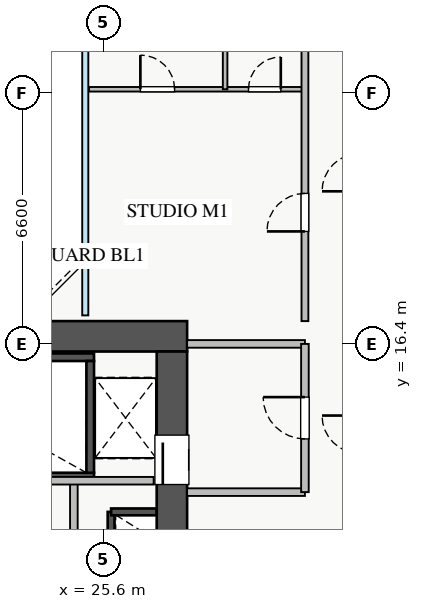
"""IFC4 building model, lengths in metres.
Left out: names, types, materials, properties, quantities, classifications, styles, units other than length and angle.
Written with IfcOpenShell. Run it as: python <this file> out.ifc"""

import sys

from ifc_helpers import new_model, si_unit, direction, frame, frame_2d, origin, place, context, subcontext, project, spatial, rectangle, extrude, source, transform, mapped, element, fill, save


model = new_model("IFC4")
c1 = context("Model", 3, precision=1e-05, world=origin(), true_north=direction((0.0, 1.0)))
c2 = subcontext(c1, "Body", "Model", "MODEL_VIEW")
j1 = project(units=[si_unit("LENGTHUNIT", "METRE"), si_unit("PLANEANGLEUNIT", "RADIAN")], contexts=[c1])
p1 = place(None, origin())
s1 = spatial("IfcSite", under=j1, at=p1, CompositionType="ELEMENT")
p2 = place(p1, origin())
s2 = spatial("IfcBuilding", under=s1, at=p2, CompositionType="ELEMENT")
p3 = place(p2, frame((0.0, 0.0, 42.5)))
s3 = spatial("IfcBuildingStorey", under=s2, at=p3, CompositionType="ELEMENT", Elevation=42.5)
p4 = place(p3, frame((25.8, 10.92, 0.0), z_axis=(0.0, 0.0, 1.0), x_axis=(0.0, 1.0, 0.0)))
e1 = element("IfcWall", 1, at=p4, inside=s3, PredefinedType="SHEAR", context=c2, shape_type="SweptSolid", body=[
    extrude(rectangle(XDim=1.06, YDim=0.18, at=frame_2d((0.53, 0.0))), origin(), (0.0, 0.0, 1.0), 3.03),
])
p5 = place(p3, frame((25.8, 11.98, 0.0), z_axis=(0.0, 0.0, 1.0), x_axis=(1.0, 0.0, 0.0)))
e2 = element("IfcWall", 2, at=p5, inside=s3, PredefinedType="SHEAR", context=c2, shape_type="SweptSolid", body=[
    extrude(rectangle(XDim=1.2, YDim=0.18, at=frame_2d((0.6, 0.0))), origin(), (0.0, 0.0, 1.0), 3.03),
])
p6 = place(p3, frame((18.2, 12.91, 0.0), z_axis=(0.0, 0.0, 1.0), x_axis=(1.0, 0.0, 0.0)))
e3 = element("IfcWall", 3, at=p6, inside=s3, PredefinedType="SHEAR", context=c2, shape_type="SweptSolid", body=[
    extrude(rectangle(XDim=7.15, YDim=0.2, at=frame_2d((3.575, 0.0))), origin(), (0.0, 0.0, 1.0), 3.25),
])
p7 = place(p6, frame((0.35, 0.0, 0.0)))
e4 = element("IfcOpeningElement", 4, at=p7, cuts=e3, PredefinedType="OPENING", context=c2, shape_type="SweptSolid", body=[
    extrude(rectangle(XDim=1.1, YDim=2.05, at=frame_2d((0.55, 1.025))), frame((0.0, 0.11, 0.0), z_axis=(0.0, -1.0, 0.0), x_axis=(1.0, 0.0, 0.0)), (0.0, 0.0, 1.0), 0.22),
])
p8 = place(p3, frame((18.2, 16.05, 0.0), z_axis=(0.0, 0.0, 1.0), x_axis=(1.0, 0.0, 0.0)))
e5 = element("IfcWall", 5, at=p8, inside=s3, PredefinedType="SHEAR", context=c2, shape_type="SweptSolid", body=[
    extrude(rectangle(XDim=7.15, YDim=0.2, at=frame_2d((3.575, 0.0))), origin(), (0.0, 0.0, 1.0), 3.25),
])
p9 = place(p3, frame((25.25, 13.01, 0.0), z_axis=(0.0, 0.0, 1.0), x_axis=(0.0, 1.0, 0.0)))
e6 = element("IfcWall", 6, at=p9, inside=s3, PredefinedType="SHEAR", context=c2, shape_type="SweptSolid", body=[
    extrude(rectangle(XDim=2.94, YDim=0.2, at=frame_2d((1.47, 0.0))), origin(), (0.0, 0.0, 1.0), 3.25),
])
p10 = place(p3, frame((10.2, 16.6, 0.0), z_axis=(0.0, 0.0, 1.0), x_axis=(1.0, 0.0, 0.0)))
e7 = element("IfcWall", 7, at=p10, inside=s3, PredefinedType="SHEAR", context=c2, shape_type="SweptSolid", body=[
    extrude(rectangle(XDim=17.6, YDim=0.8, at=frame_2d((8.8, 0.0))), origin(), (0.0, 0.0, 1.0), 3.25),
])
p11 = place(p3, frame((27.4, 10.6, 0.0), z_axis=(0.0, 0.0, 1.0), x_axis=(0.0, 1.0, 0.0)))
e8 = element("IfcWall", 8, at=p11, inside=s3, PredefinedType="SHEAR", context=c2, shape_type="SweptSolid", body=[
    extrude(rectangle(XDim=5.6, YDim=0.8, at=frame_2d((2.8, 0.0))), origin(), (0.0, 0.0, 1.0), 3.25),
])
p12 = place(p11, frame((2.1, 0.0, 0.0)))
e9 = element("IfcOpeningElement", 9, at=p12, cuts=e8, PredefinedType="OPENING", context=c2, shape_type="SweptSolid", body=[
    extrude(rectangle(XDim=1.3, YDim=2.05, at=frame_2d((0.65, 1.025))), frame((0.0, 0.41, 0.0), z_axis=(0.0, -1.0, 0.0), x_axis=(1.0, 0.0, 0.0)), (0.0, 0.0, 1.0), 0.82),
])
for number, where, z_axis, x_axis in (
    (10, (27.8, 16.4, 0.0), (0.0, 0.0, 1.0), (1.0, 0.0, 0.0)),
    (11, (27.8, 12.5, 0.0), (0.0, 0.0, 1.0), (1.0, 0.0, 0.0)),
):
    element("IfcWall", number, at=place(p3, frame(where, z_axis=z_axis, x_axis=x_axis)), inside=s3, PredefinedType="PARTITIONING", context=c2, shape_type="SweptSolid", body=[
        extrude(rectangle(XDim=3.1, YDim=0.2, at=frame_2d((1.55, 0.0))), origin(), (0.0, 0.0, 1.0), 3.03),
    ])
p13 = place(p3, frame((30.9, 12.5, 0.0), z_axis=(0.0, 0.0, 1.0), x_axis=(0.0, 1.0, 0.0)))
e12 = element("IfcWall", 12, at=p13, inside=s3, PredefinedType="PARTITIONING", context=c2, shape_type="SweptSolid", body=[
    extrude(rectangle(XDim=3.9, YDim=0.2, at=frame_2d((1.95, 0.0))), origin(), (0.0, 0.0, 1.0), 3.03),
])
p14 = place(p13, frame((1.4, 0.0, 0.0)))
e13 = element("IfcOpeningElement", 13, at=p14, cuts=e12, PredefinedType="OPENING", context=c2, shape_type="SweptSolid", body=[
    extrude(rectangle(XDim=1.1, YDim=2.05, at=frame_2d((0.55, 1.025))), frame((0.0, 0.11, 0.0), z_axis=(0.0, -1.0, 0.0), x_axis=(1.0, 0.0, 0.0)), (0.0, 0.0, 1.0), 0.22),
])
p15 = place(p3, frame((24.82, 10.15, 0.0), z_axis=(0.0, 0.0, 1.0), x_axis=(0.0, 1.0, 0.0)))
e14 = element("IfcWall", 14, at=p15, inside=s3, PredefinedType="PARTITIONING", context=c2, shape_type="SweptSolid", body=[
    extrude(rectangle(XDim=2.65, YDim=0.2, at=frame_2d((1.325, 0.0))), origin(), (0.0, 0.0, 1.0), 3.03),
])
p16 = place(p3, frame((21.75, 12.8, 0.0), z_axis=(0.0, 0.0, 1.0), x_axis=(1.0, 0.0, 0.0)))
e15 = element("IfcWall", 15, at=p16, inside=s3, PredefinedType="PARTITIONING", context=c2, shape_type="SweptSolid", body=[
    extrude(rectangle(XDim=5.17, YDim=0.2, at=frame_2d((2.585, 0.0))), origin(), (0.0, 0.0, 1.0), 3.03),
])
p17 = place(p3, frame((25.22, 23.1, 0.0), z_axis=(0.0, 0.0, 1.0), x_axis=(1.0, 0.0, 0.0)))
e16 = element("IfcWall", 16, at=p17, inside=s3, PredefinedType="PLUMBINGWALL", context=c2, shape_type="SweptSolid", body=[
    extrude(rectangle(XDim=5.68, YDim=0.12, at=frame_2d((2.84, 0.0))), origin(), (0.0, 0.0, 1.0), 3.03),
])
p18 = place(p17, frame((1.35, 0.0, 0.0)))
e17 = element("IfcOpeningElement", 17, at=p18, cuts=e16, PredefinedType="OPENING", context=c2, shape_type="SweptSolid", body=[
    extrude(rectangle(XDim=0.9, YDim=2.05, at=frame_2d((0.45, 1.025))), frame((0.0, 0.07, 0.0), z_axis=(0.0, -1.0, 0.0), x_axis=(1.0, 0.0, 0.0)), (0.0, 0.0, 1.0), 0.14),
])
p19 = place(p17, frame((4.195, 0.0, 0.0)))
e18 = element("IfcOpeningElement", 18, at=p19, cuts=e16, PredefinedType="OPENING", context=c2, shape_type="SweptSolid", body=[
    extrude(rectangle(XDim=0.85, YDim=2.05, at=frame_2d((0.425, 1.025))), frame((0.0, 0.07, 0.0), z_axis=(0.0, -1.0, 0.0), x_axis=(1.0, 0.0, 0.0)), (0.0, 0.0, 1.0), 0.14),
])
p20 = place(p3, frame((28.8, 23.1, 0.0), z_axis=(0.0, 0.0, 1.0), x_axis=(0.0, 1.0, 0.0)))
e19 = element("IfcWall", 19, at=p20, inside=s3, PredefinedType="PLUMBINGWALL", context=c2, shape_type="SweptSolid", body=[
    extrude(rectangle(XDim=5.9, YDim=0.12, at=frame_2d((2.95, 0.0))), origin(), (0.0, 0.0, 1.0), 3.03),
])
p21 = place(p3, frame((30.9, 17.0, 0.0), z_axis=(0.0, 0.0, 1.0), x_axis=(0.0, 1.0, 0.0)))
e20 = element("IfcWall", 20, at=p21, inside=s3, PredefinedType="PARTITIONING", context=c2, shape_type="SweptSolid", body=[
    extrude(rectangle(XDim=12.0, YDim=0.18, at=frame_2d((6.0, 0.0))), origin(), (0.0, 0.0, 1.0), 3.03),
])
p22 = place(p21, frame((2.36, 0.0, 0.0)))
e21 = element("IfcOpeningElement", 21, at=p22, cuts=e20, PredefinedType="OPENING", context=c2, shape_type="SweptSolid", body=[
    extrude(rectangle(XDim=1.0, YDim=2.05, at=frame_2d((0.5, 1.025))), frame((0.0, 0.1, 0.0), z_axis=(0.0, -1.0, 0.0), x_axis=(1.0, 0.0, 0.0)), (0.0, 0.0, 1.0), 0.2),
])
m1 = source(origin(), c2, "Body", "SweptSolid", [
    extrude(rectangle(XDim=1.3, YDim=2.05, at=frame_2d((0.65, 1.025))), frame((0.0, 0.025, 0.0), z_axis=(0.0, -1.0, 0.0), x_axis=(1.0, 0.0, 0.0)), (0.0, 0.0, 1.0), 0.05),
])
p23 = place(p12, origin())
e22 = element("IfcDoor", 22, at=p23, inside=s3, OperationType="SLIDING_TO_RIGHT", PredefinedType="DOOR", context=c2, shape_type="MappedRepresentation", body=[
    mapped(m1, transform((0.0, 0.0, 0.0), x_axis=(1.0, 0.0, 0.0), y_axis=(0.0, 1.0, 0.0), z_axis=(0.0, 0.0, 1.0), scale=1.0)),
])
fill(e9, e22)
m2 = source(origin(), c2, "Body", "SweptSolid", [
    extrude(rectangle(XDim=1.1, YDim=2.05, at=frame_2d((0.55, 1.025))), frame((0.0, 0.025, 0.0), z_axis=(0.0, -1.0, 0.0), x_axis=(1.0, 0.0, 0.0)), (0.0, 0.0, 1.0), 0.05),
])
p24 = place(p14, origin())
e23 = element("IfcDoor", 23, at=p24, inside=s3, OperationType="SINGLE_SWING_RIGHT", PredefinedType="DOOR", context=c2, shape_type="MappedRepresentation", body=[
    mapped(m2, transform((0.0, 0.0, 0.0), x_axis=(1.0, 0.0, 0.0), y_axis=(0.0, 1.0, 0.0), z_axis=(0.0, 0.0, 1.0), scale=1.0)),
])
fill(e13, e23)
m3 = source(origin(), c2, "Body", "SweptSolid", [
    extrude(rectangle(XDim=0.9, YDim=2.05, at=frame_2d((0.45, 1.025))), frame((0.0, 0.025, 0.0), z_axis=(0.0, -1.0, 0.0), x_axis=(1.0, 0.0, 0.0)), (0.0, 0.0, 1.0), 0.05),
])
p25 = place(p18, origin())
e24 = element("IfcDoor", 24, at=p25, inside=s3, OperationType="SINGLE_SWING_LEFT", PredefinedType="DOOR", context=c2, shape_type="MappedRepresentation", body=[
    mapped(m3, transform((0.0, 0.0, 0.0), x_axis=(1.0, 0.0, 0.0), y_axis=(0.0, 1.0, 0.0), z_axis=(0.0, 0.0, 1.0), scale=1.0)),
])
fill(e17, e24)
m4 = source(origin(), c2, "Body", "SweptSolid", [
    extrude(rectangle(XDim=0.85, YDim=2.05, at=frame_2d((0.425, 1.025))), frame((0.0, 0.025, 0.0), z_axis=(0.0, -1.0, 0.0), x_axis=(1.0, 0.0, 0.0)), (0.0, 0.0, 1.0), 0.05),
])
p26 = place(p19, origin())
e25 = element("IfcDoor", 25, at=p26, inside=s3, OperationType="SINGLE_SWING_RIGHT", PredefinedType="DOOR", context=c2, shape_type="MappedRepresentation", body=[
    mapped(m4, transform((0.0, 0.0, 0.0), x_axis=(1.0, 0.0, 0.0), y_axis=(0.0, 1.0, 0.0), z_axis=(0.0, 0.0, 1.0), scale=1.0)),
])
fill(e18, e25)
m5 = source(origin(), c2, "Body", "SweptSolid", [
    extrude(rectangle(XDim=1.0, YDim=2.05, at=frame_2d((0.5, 1.025))), frame((0.0, 0.025, 0.0), z_axis=(0.0, -1.0, 0.0), x_axis=(1.0, 0.0, 0.0)), (0.0, 0.0, 1.0), 0.05),
])
p27 = place(p22, origin())
e26 = element("IfcDoor", 26, at=p27, inside=s3, OperationType="SINGLE_SWING_LEFT", PredefinedType="DOOR", context=c2, shape_type="MappedRepresentation", body=[
    mapped(m5, transform((0.0, 0.0, 0.0), x_axis=(1.0, 0.0, 0.0), y_axis=(0.0, 1.0, 0.0), z_axis=(0.0, 0.0, 1.0), scale=1.0)),
])
fill(e21, e26)
save(model, sys.argv[1])
